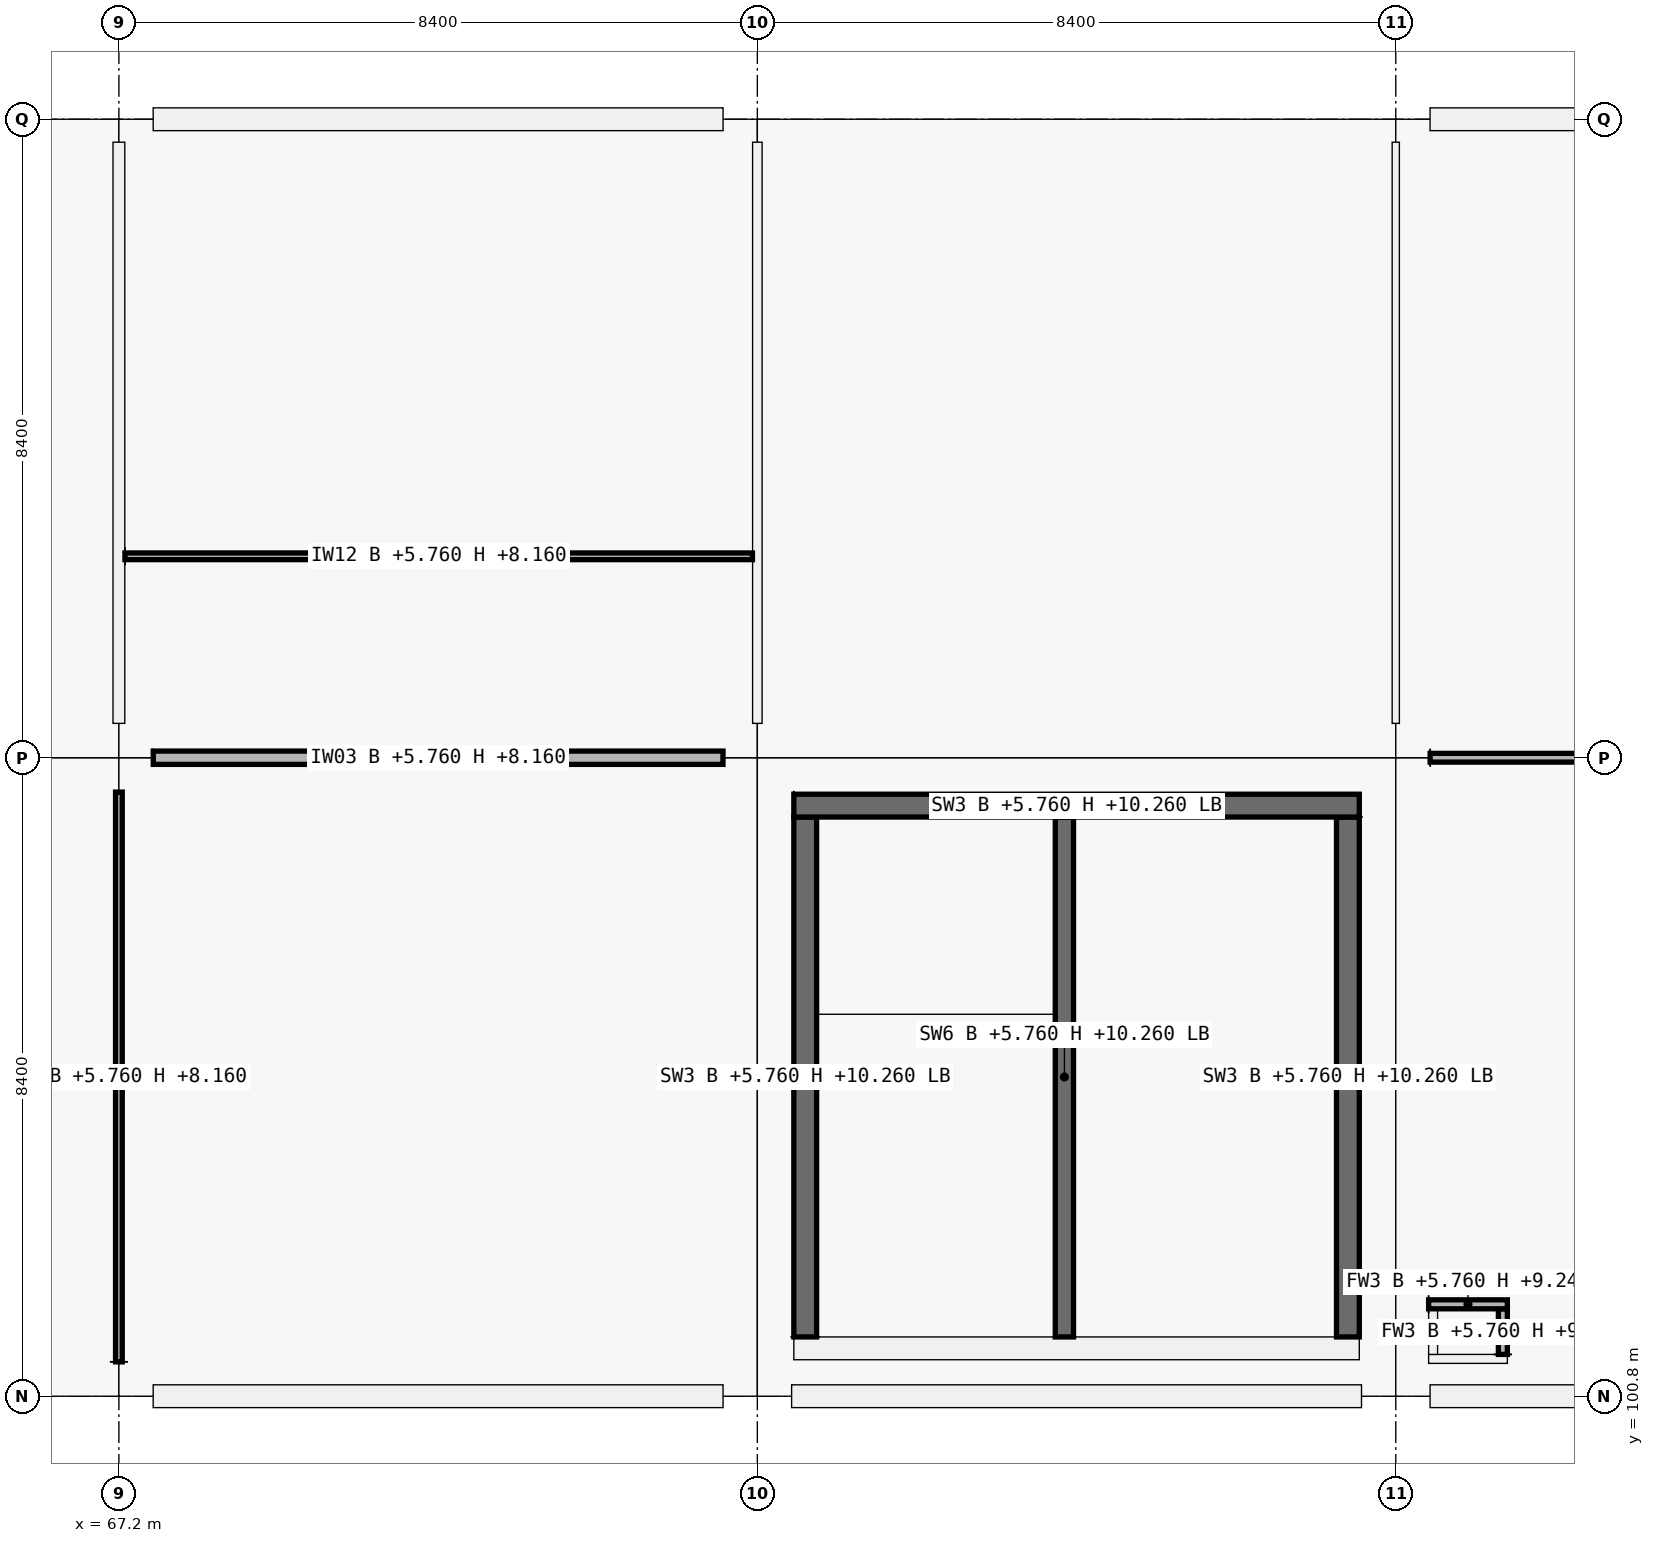
"""IFC4 building model, lengths in metres.
Left out: names, types, materials, properties, quantities, classifications, styles, units other than length and angle.
Written with IfcOpenShell. Run it as: python <this file> out.ifc"""

import sys

from ifc_helpers import new_model, si_unit, direction, frame, frame_2d, origin, origin_2d, place, context, subcontext, project, spatial, rectangle, extrude, element, fill, save


model = new_model("IFC4")
c1 = context("Model", 3, precision=1e-05, world=origin(), true_north=direction((0.0, 1.0)))
c2 = subcontext(c1, "Body", "Model", "MODEL_VIEW")
j1 = project(units=[si_unit("LENGTHUNIT", "METRE"), si_unit("PLANEANGLEUNIT", "RADIAN")], contexts=[c1])
p1 = place(None, origin())
s1 = spatial("IfcSite", under=j1, at=p1, CompositionType="ELEMENT")
p2 = place(p1, origin())
s2 = spatial("IfcBuilding", under=s1, at=p2, CompositionType="ELEMENT")
p3 = place(p2, frame((0.0, 0.0, 5.76)))
s3 = spatial("IfcBuildingStorey", under=s2, at=p3, CompositionType="ELEMENT", Elevation=5.76)
for number, where, z_axis, x_axis in (
    (1, (67.2, 100.8, 0.0), (0.0, 0.0, 1.0), (1.0, 0.0, 0.0)),
    (2, (67.2, 109.2, 0.0), (0.0, 0.0, 1.0), (1.0, 0.0, 0.0)),
):
    element("IfcColumn", number, at=place(p3, frame(where, z_axis=z_axis, x_axis=x_axis)), inside=s3, PredefinedType="COLUMN", context=c2, shape_type="SweptSolid", body=[
        extrude(rectangle(XDim=0.9, YDim=0.9, at=origin_2d()), origin(), (0.0, 0.0, 1.0), 4.5),
    ])
p4 = place(p3, frame((67.2, 117.6, 0.0), z_axis=(0.0, 0.0, 1.0), x_axis=(1.0, 0.0, 0.0)))
e3 = element("IfcColumn", 3, at=p4, inside=s3, PredefinedType="COLUMN", context=c2, shape_type="SweptSolid", body=[
    extrude(rectangle(XDim=0.9, YDim=0.6, at=origin_2d()), origin(), (0.0, 0.0, 1.0), 4.5),
])
for number, where, z_axis, x_axis in (
    (4, (75.6, 100.8, 0.0), (0.0, 0.0, 1.0), (1.0, 0.0, 0.0)),
    (5, (75.6, 109.2, 0.0), (0.0, 0.0, 1.0), (1.0, 0.0, 0.0)),
):
    element("IfcColumn", number, at=place(p3, frame(where, z_axis=z_axis, x_axis=x_axis)), inside=s3, PredefinedType="COLUMN", context=c2, shape_type="SweptSolid", body=[
        extrude(rectangle(XDim=0.9, YDim=0.9, at=origin_2d()), origin(), (0.0, 0.0, 1.0), 4.5),
    ])
p5 = place(p3, frame((75.6, 117.6, 0.0), z_axis=(0.0, 0.0, 1.0), x_axis=(1.0, 0.0, 0.0)))
e6 = element("IfcColumn", 6, at=p5, inside=s3, PredefinedType="COLUMN", context=c2, shape_type="SweptSolid", body=[
    extrude(rectangle(XDim=0.9, YDim=0.6, at=origin_2d()), origin(), (0.0, 0.0, 1.0), 4.5),
])
for number, where, z_axis, x_axis in (
    (7, (84.0, 100.8, 0.0), (0.0, 0.0, 1.0), (1.0, 0.0, 0.0)),
    (8, (84.0, 109.2, 0.0), (0.0, 0.0, 1.0), (1.0, 0.0, 0.0)),
):
    element("IfcColumn", number, at=place(p3, frame(where, z_axis=z_axis, x_axis=x_axis)), inside=s3, PredefinedType="COLUMN", context=c2, shape_type="SweptSolid", body=[
        extrude(rectangle(XDim=0.9, YDim=0.9, at=origin_2d()), origin(), (0.0, 0.0, 1.0), 4.5),
    ])
p6 = place(p3, frame((84.0, 117.6, 0.0), z_axis=(0.0, 0.0, 1.0), x_axis=(1.0, 0.0, 0.0)))
e9 = element("IfcColumn", 9, at=p6, inside=s3, PredefinedType="COLUMN", context=c2, shape_type="SweptSolid", body=[
    extrude(rectangle(XDim=0.9, YDim=0.6, at=origin_2d()), origin(), (0.0, 0.0, 1.0), 4.5),
])
p7 = place(p3, frame((75.149, 100.8, 0.0), z_axis=(0.0, 0.0, 1.0), x_axis=(-1.0, 0.0, 0.0)))
e10 = element("IfcWall", 10, at=p7, inside=s3, PredefinedType="SOLIDWALL", context=c2, shape_type="SweptSolid", body=[
    extrude(rectangle(XDim=7.498, YDim=0.3, at=frame_2d((3.749, 0.0))), origin(), (0.0, 0.0, 1.0), 3.4),
])
p8 = place(p7, frame((2.549, 0.0, 0.9)))
e11 = element("IfcOpeningElement", 11, at=p8, cuts=e10, PredefinedType="OPENING", context=c2, shape_type="SweptSolid", body=[
    extrude(rectangle(XDim=2.4, YDim=1.8, at=frame_2d((1.2, 0.9))), frame((0.0, 0.15, 0.0), z_axis=(0.0, -1.0, 0.0), x_axis=(1.0, 0.0, 0.0)), (0.0, 0.0, 1.0), 0.3),
])
p9 = place(p3, frame((67.651, 117.6, 0.0), z_axis=(0.0, 0.0, 1.0), x_axis=(1.0, 0.0, 0.0)))
e12 = element("IfcWall", 12, at=p9, inside=s3, PredefinedType="SOLIDWALL", context=c2, shape_type="SweptSolid", body=[
    extrude(rectangle(XDim=7.498, YDim=0.3, at=frame_2d((3.749, 0.0))), origin(), (0.0, 0.0, 1.0), 3.4),
])
p10 = place(p9, frame((2.999, 0.0, 0.9)))
e13 = element("IfcOpeningElement", 13, at=p10, cuts=e12, PredefinedType="OPENING", context=c2, shape_type="SweptSolid", body=[
    extrude(rectangle(XDim=1.5, YDim=1.8, at=frame_2d((0.75, 0.9))), frame((0.0, 0.15, 0.0), z_axis=(0.0, -1.0, 0.0), x_axis=(1.0, 0.0, 0.0)), (0.0, 0.0, 1.0), 0.3),
])
p11 = place(p3, frame((83.549, 100.8, 0.0), z_axis=(0.0, 0.0, 1.0), x_axis=(-1.0, 0.0, 0.0)))
e14 = element("IfcWall", 14, at=p11, inside=s3, PredefinedType="SOLIDWALL", context=c2, shape_type="SweptSolid", body=[
    extrude(rectangle(XDim=7.498, YDim=0.3, at=frame_2d((3.749, 0.0))), origin(), (0.0, 0.0, 1.0), 3.4),
])
p12 = place(p3, frame((91.949, 100.8, 0.0), z_axis=(0.0, 0.0, 1.0), x_axis=(-1.0, 0.0, 0.0)))
e15 = element("IfcWall", 15, at=p12, inside=s3, PredefinedType="SOLIDWALL", context=c2, shape_type="SweptSolid", body=[
    extrude(rectangle(XDim=7.498, YDim=0.3, at=frame_2d((3.749, 0.0))), origin(), (0.0, 0.0, 1.0), 3.4),
])
p13 = place(p12, frame((2.249, 0.0, 0.9)))
e16 = element("IfcOpeningElement", 16, at=p13, cuts=e15, PredefinedType="OPENING", context=c2, shape_type="SweptSolid", body=[
    extrude(rectangle(XDim=3.0, YDim=1.2, at=frame_2d((1.5, 0.6))), frame((0.0, 0.15, 0.0), z_axis=(0.0, -1.0, 0.0), x_axis=(1.0, 0.0, 0.0)), (0.0, 0.0, 1.0), 0.3),
])
p14 = place(p3, frame((84.451, 117.6, 0.0), z_axis=(0.0, 0.0, 1.0), x_axis=(1.0, 0.0, 0.0)))
e17 = element("IfcWall", 17, at=p14, inside=s3, PredefinedType="SOLIDWALL", context=c2, shape_type="SweptSolid", body=[
    extrude(rectangle(XDim=7.498, YDim=0.3, at=frame_2d((3.749, 0.0))), origin(), (0.0, 0.0, 1.0), 3.4),
])
p15 = place(p14, frame((2.399, 0.0, 0.9)))
e18 = element("IfcOpeningElement", 18, at=p15, cuts=e17, PredefinedType="OPENING", context=c2, shape_type="SweptSolid", body=[
    extrude(rectangle(XDim=2.7, YDim=1.2, at=frame_2d((1.35, 0.6))), frame((0.0, 0.15, 0.0), z_axis=(0.0, -1.0, 0.0), x_axis=(1.0, 0.0, 0.0)), (0.0, 0.0, 1.0), 0.3),
])
p16 = place(p3, frame((83.52, 101.43, 0.0), z_axis=(0.0, 0.0, 1.0), x_axis=(-1.0, 0.0, 0.0)))
e19 = element("IfcWall", 19, at=p16, inside=s3, PredefinedType="SHEAR", context=c2, shape_type="SweptSolid", body=[
    extrude(rectangle(XDim=7.44, YDim=0.3, at=frame_2d((3.72, 0.0))), origin(), (0.0, 0.0, 1.0), 4.5),
])
p17 = place(p3, frame((76.23, 101.58, 0.0), z_axis=(0.0, 0.0, 1.0), x_axis=(0.0, 1.0, 0.0)))
e20 = element("IfcWall", 20, at=p17, inside=s3, PredefinedType="SHEAR", context=c2, shape_type="SweptSolid", body=[
    extrude(rectangle(XDim=6.84, YDim=0.3, at=frame_2d((3.42, 0.0))), origin(), (0.0, 0.0, 1.0), 4.5),
])
p18 = place(p3, frame((76.08, 108.57, 0.0), z_axis=(0.0, 0.0, 1.0), x_axis=(1.0, 0.0, 0.0)))
e21 = element("IfcWall", 21, at=p18, inside=s3, PredefinedType="SHEAR", context=c2, shape_type="SweptSolid", body=[
    extrude(rectangle(XDim=7.44, YDim=0.3, at=frame_2d((3.72, 0.0))), origin(), (0.0, 0.0, 1.0), 4.5),
])
p19 = place(p3, frame((83.37, 108.42, 0.0), z_axis=(0.0, 0.0, 1.0), x_axis=(0.0, -1.0, 0.0)))
e22 = element("IfcWall", 22, at=p19, inside=s3, PredefinedType="SHEAR", context=c2, shape_type="SweptSolid", body=[
    extrude(rectangle(XDim=6.84, YDim=0.3, at=frame_2d((3.42, 0.0))), origin(), (0.0, 0.0, 1.0), 4.5),
])
p20 = place(p19, frame((3.97, 0.0, 0.0)))
e23 = element("IfcOpeningElement", 23, at=p20, cuts=e22, PredefinedType="OPENING", context=c2, shape_type="SweptSolid", body=[
    extrude(rectangle(XDim=1.5, YDim=2.15, at=frame_2d((0.75, 1.075))), frame((0.0, 0.15, 0.0), z_axis=(0.0, -1.0, 0.0), x_axis=(1.0, 0.0, 0.0)), (0.0, 0.0, 1.0), 0.3),
])
p21 = place(p3, frame((79.64, 101.58, 0.0), z_axis=(0.0, 0.0, 1.0), x_axis=(0.0, 1.0, 0.0)))
e24 = element("IfcWall", 24, at=p21, inside=s3, PredefinedType="SHEAR", context=c2, shape_type="SweptSolid", body=[
    extrude(rectangle(XDim=6.84, YDim=0.24, at=frame_2d((3.42, 0.0))), origin(), (0.0, 0.0, 1.0), 4.5),
])
p22 = place(p21, frame((0.12, 0.0, 0.0)))
e25 = element("IfcOpeningElement", 25, at=p22, cuts=e24, PredefinedType="OPENING", context=c2, shape_type="SweptSolid", body=[
    extrude(rectangle(XDim=1.0, YDim=2.15, at=frame_2d((0.5, 1.075))), frame((0.0, 0.12, 0.0), z_axis=(0.0, -1.0, 0.0), x_axis=(1.0, 0.0, 0.0)), (0.0, 0.0, 1.0), 0.24),
])
for number, where, z_axis, x_axis in (
    (26, (84.432, 101.291, 0.0), (0.0, 0.0, 1.0), (1.0, 0.0, 0.0)),
    (27, (84.432, 102.009, 0.0), (0.0, 0.0, 1.0), (1.0, 0.0, 0.0)),
):
    element("IfcWall", number, at=place(p3, frame(where, z_axis=z_axis, x_axis=x_axis)), inside=s3, PredefinedType="PARTITIONING", context=c2, shape_type="SweptSolid", body=[
        extrude(rectangle(XDim=1.036, YDim=0.118, at=frame_2d((0.518, 0.0))), origin(), (0.0, 0.0, 1.0), 3.48),
    ])
for number, where, z_axis, x_axis in (
    (28, (84.491, 101.35, 0.0), (0.0, 0.0, 1.0), (0.0, 1.0, 0.0)),
    (29, (85.409, 101.35, 0.0), (0.0, 0.0, 1.0), (0.0, 1.0, 0.0)),
):
    element("IfcWall", number, at=place(p3, frame(where, z_axis=z_axis, x_axis=x_axis)), inside=s3, PredefinedType="PARTITIONING", context=c2, shape_type="SweptSolid", body=[
        extrude(rectangle(XDim=0.6, YDim=0.118, at=frame_2d((0.3, 0.0))), origin(), (0.0, 0.0, 1.0), 3.48),
    ])
p23 = place(p3, frame((67.652, 109.2, 0.0), z_axis=(0.0, 0.0, 1.0), x_axis=(1.0, 0.0, 0.0)))
e30 = element("IfcWall", 30, at=p23, inside=s3, PredefinedType="PARTITIONING", context=c2, shape_type="SweptSolid", body=[
    extrude(rectangle(XDim=7.496, YDim=0.175, at=frame_2d((3.748, 0.0))), origin(), (0.0, 0.0, 1.0), 2.4),
])
p24 = place(p3, frame((84.452, 109.2, 0.0), z_axis=(0.0, 0.0, 1.0), x_axis=(1.0, 0.0, 0.0)))
e31 = element("IfcWall", 31, at=p24, inside=s3, PredefinedType="PARTITIONING", context=c2, shape_type="SweptSolid", body=[
    extrude(rectangle(XDim=7.496, YDim=0.115, at=frame_2d((3.748, 0.0))), origin(), (0.0, 0.0, 1.0), 2.4),
])
p25 = place(p24, frame((3.218, 0.0, 0.0)))
e32 = element("IfcOpeningElement", 32, at=p25, cuts=e31, PredefinedType="OPENING", context=c2, shape_type="SweptSolid", body=[
    extrude(rectangle(XDim=1.06, YDim=2.22, at=frame_2d((0.53, 1.11))), frame((0.0, 0.058, 0.0), z_axis=(0.0, -1.0, 0.0), x_axis=(1.0, 0.0, 0.0)), (0.0, 0.0, 1.0), 0.115),
])
p26 = place(p3, frame((67.2, 101.252, 0.0), z_axis=(0.0, 0.0, 1.0), x_axis=(0.0, 1.0, 0.0)))
e33 = element("IfcWall", 33, at=p26, inside=s3, PredefinedType="PARTITIONING", context=c2, shape_type="SweptSolid", body=[
    extrude(rectangle(XDim=7.496, YDim=0.088, at=frame_2d((3.748, 0.0))), origin(), (0.0, 0.0, 1.0), 2.4),
])
p27 = place(p26, frame((3.268, 0.0, 0.0)))
e34 = element("IfcOpeningElement", 34, at=p27, cuts=e33, PredefinedType="OPENING", context=c2, shape_type="SweptSolid", body=[
    extrude(rectangle(XDim=0.96, YDim=2.18, at=frame_2d((0.48, 1.09))), frame((0.0, 0.044, 0.0), z_axis=(0.0, -1.0, 0.0), x_axis=(1.0, 0.0, 0.0)), (0.0, 0.0, 1.0), 0.088),
])
p28 = place(p3, frame((67.2, 109.652, 0.0), z_axis=(0.0, 0.0, 1.0), x_axis=(0.0, 1.0, 0.0)))
e35 = element("IfcWall", 35, at=p28, inside=s3, PredefinedType="PARTITIONING", context=c2, shape_type="SweptSolid", body=[
    extrude(rectangle(XDim=7.646, YDim=0.155, at=frame_2d((3.823, 0.0))), origin(), (0.0, 0.0, 1.0), 2.4),
])
p29 = place(p28, frame((0.533, 0.0, 0.0)))
e36 = element("IfcOpeningElement", 36, at=p29, cuts=e35, PredefinedType="OPENING", context=c2, shape_type="SweptSolid", body=[
    extrude(rectangle(XDim=0.96, YDim=2.1, at=frame_2d((0.48, 1.05))), frame((0.0, 0.078, 0.0), z_axis=(0.0, -1.0, 0.0), x_axis=(1.0, 0.0, 0.0)), (0.0, 0.0, 1.0), 0.155),
])
p30 = place(p28, frame((4.473, 0.0, 0.0)))
e37 = element("IfcOpeningElement", 37, at=p30, cuts=e35, PredefinedType="OPENING", context=c2, shape_type="SweptSolid", body=[
    extrude(rectangle(XDim=0.92, YDim=2.1, at=frame_2d((0.46, 1.05))), frame((0.0, 0.078, 0.0), z_axis=(0.0, -1.0, 0.0), x_axis=(1.0, 0.0, 0.0)), (0.0, 0.0, 1.0), 0.155),
])
p31 = place(p3, frame((75.6, 109.652, 0.0), z_axis=(0.0, 0.0, 1.0), x_axis=(0.0, 1.0, 0.0)))
e38 = element("IfcWall", 38, at=p31, inside=s3, PredefinedType="PARTITIONING", context=c2, shape_type="SweptSolid", body=[
    extrude(rectangle(XDim=7.646, YDim=0.125, at=frame_2d((3.823, 0.0))), origin(), (0.0, 0.0, 1.0), 2.4),
])
p32 = place(p3, frame((84.0, 109.652, 0.0), z_axis=(0.0, 0.0, 1.0), x_axis=(0.0, 1.0, 0.0)))
e39 = element("IfcWall", 39, at=p32, inside=s3, PredefinedType="PARTITIONING", context=c2, shape_type="SweptSolid", body=[
    extrude(rectangle(XDim=7.646, YDim=0.095, at=frame_2d((3.823, 0.0))), origin(), (0.0, 0.0, 1.0), 2.4),
])
p33 = place(p32, frame((3.353, 0.0, 0.0)))
e40 = element("IfcOpeningElement", 40, at=p33, cuts=e39, PredefinedType="OPENING", context=c2, shape_type="SweptSolid", body=[
    extrude(rectangle(XDim=0.94, YDim=2.15, at=frame_2d((0.47, 1.075))), frame((0.0, 0.047, 0.0), z_axis=(0.0, -1.0, 0.0), x_axis=(1.0, 0.0, 0.0)), (0.0, 0.0, 1.0), 0.095),
])
p34 = place(p3, frame((67.28, 111.85, 0.0), z_axis=(0.0, 0.0, 1.0), x_axis=(1.0, 0.0, 0.0)))
e41 = element("IfcWall", 41, at=p34, inside=s3, PredefinedType="PARTITIONING", context=c2, shape_type="SweptSolid", body=[
    extrude(rectangle(XDim=8.256, YDim=0.088, at=frame_2d((4.128, 0.0))), origin(), (0.0, 0.0, 1.0), 2.4),
])
p35 = place(p8, origin())
e42 = element("IfcWindow", 42, at=p35, inside=s3, PartitioningType="SINGLE_PANEL", PredefinedType="WINDOW", context=c2, shape_type="SweptSolid", body=[
    extrude(rectangle(XDim=2.4, YDim=1.8, at=frame_2d((1.2, 0.9))), frame((0.0, 0.03, 0.0), z_axis=(0.0, -1.0, 0.0), x_axis=(1.0, 0.0, 0.0)), (0.0, 0.0, 1.0), 0.06),
])
fill(e11, e42)
p36 = place(p10, origin())
e43 = element("IfcWindow", 43, at=p36, inside=s3, PartitioningType="SINGLE_PANEL", PredefinedType="WINDOW", context=c2, shape_type="SweptSolid", body=[
    extrude(rectangle(XDim=1.5, YDim=1.8, at=frame_2d((0.75, 0.9))), frame((0.0, 0.03, 0.0), z_axis=(0.0, -1.0, 0.0), x_axis=(1.0, 0.0, 0.0)), (0.0, 0.0, 1.0), 0.06),
])
fill(e13, e43)
p37 = place(p22, origin())
e44 = element("IfcDoor", 44, at=p37, inside=s3, OperationType="SINGLE_SWING_RIGHT", PredefinedType="DOOR", context=c2, shape_type="SweptSolid", body=[
    extrude(rectangle(XDim=1.0, YDim=2.15, at=frame_2d((0.5, 1.075))), frame((0.0, 0.025, 0.0), z_axis=(0.0, -1.0, 0.0), x_axis=(1.0, 0.0, 0.0)), (0.0, 0.0, 1.0), 0.05),
])
fill(e25, e44)
p38 = place(p20, origin())
e45 = element("IfcDoor", 45, at=p38, inside=s3, OperationType="DOUBLE_DOOR_SINGLE_SWING", PredefinedType="DOOR", context=c2, shape_type="SweptSolid", body=[
    extrude(rectangle(XDim=1.5, YDim=2.15, at=frame_2d((0.75, 1.075))), frame((0.0, 0.025, 0.0), z_axis=(0.0, -1.0, 0.0), x_axis=(1.0, 0.0, 0.0)), (0.0, 0.0, 1.0), 0.05),
])
fill(e23, e45)
p39 = place(p29, origin())
e46 = element("IfcDoor", 46, at=p39, inside=s3, OperationType="SINGLE_SWING_RIGHT", PredefinedType="DOOR", context=c2, shape_type="SweptSolid", body=[
    extrude(rectangle(XDim=0.96, YDim=2.1, at=frame_2d((0.48, 1.05))), frame((0.0, 0.025, 0.0), z_axis=(0.0, -1.0, 0.0), x_axis=(1.0, 0.0, 0.0)), (0.0, 0.0, 1.0), 0.05),
])
fill(e36, e46)
p40 = place(p30, origin())
e47 = element("IfcDoor", 47, at=p40, inside=s3, OperationType="SINGLE_SWING_LEFT", PredefinedType="DOOR", context=c2, shape_type="SweptSolid", body=[
    extrude(rectangle(XDim=0.92, YDim=2.1, at=frame_2d((0.46, 1.05))), frame((0.0, 0.025, 0.0), z_axis=(0.0, -1.0, 0.0), x_axis=(1.0, 0.0, 0.0)), (0.0, 0.0, 1.0), 0.05),
])
fill(e37, e47)
p41 = place(p27, origin())
e48 = element("IfcDoor", 48, at=p41, inside=s3, OperationType="SINGLE_SWING_LEFT", PredefinedType="DOOR", context=c2, shape_type="SweptSolid", body=[
    extrude(rectangle(XDim=0.96, YDim=2.18, at=frame_2d((0.48, 1.09))), frame((0.0, 0.025, 0.0), z_axis=(0.0, -1.0, 0.0), x_axis=(1.0, 0.0, 0.0)), (0.0, 0.0, 1.0), 0.05),
])
fill(e34, e48)
p42 = place(p33, origin())
e49 = element("IfcDoor", 49, at=p42, inside=s3, OperationType="SINGLE_SWING_RIGHT", PredefinedType="DOOR", context=c2, shape_type="SweptSolid", body=[
    extrude(rectangle(XDim=0.94, YDim=2.15, at=frame_2d((0.47, 1.075))), frame((0.0, 0.025, 0.0), z_axis=(0.0, -1.0, 0.0), x_axis=(1.0, 0.0, 0.0)), (0.0, 0.0, 1.0), 0.05),
])
fill(e40, e49)
save(model, sys.argv[1])
